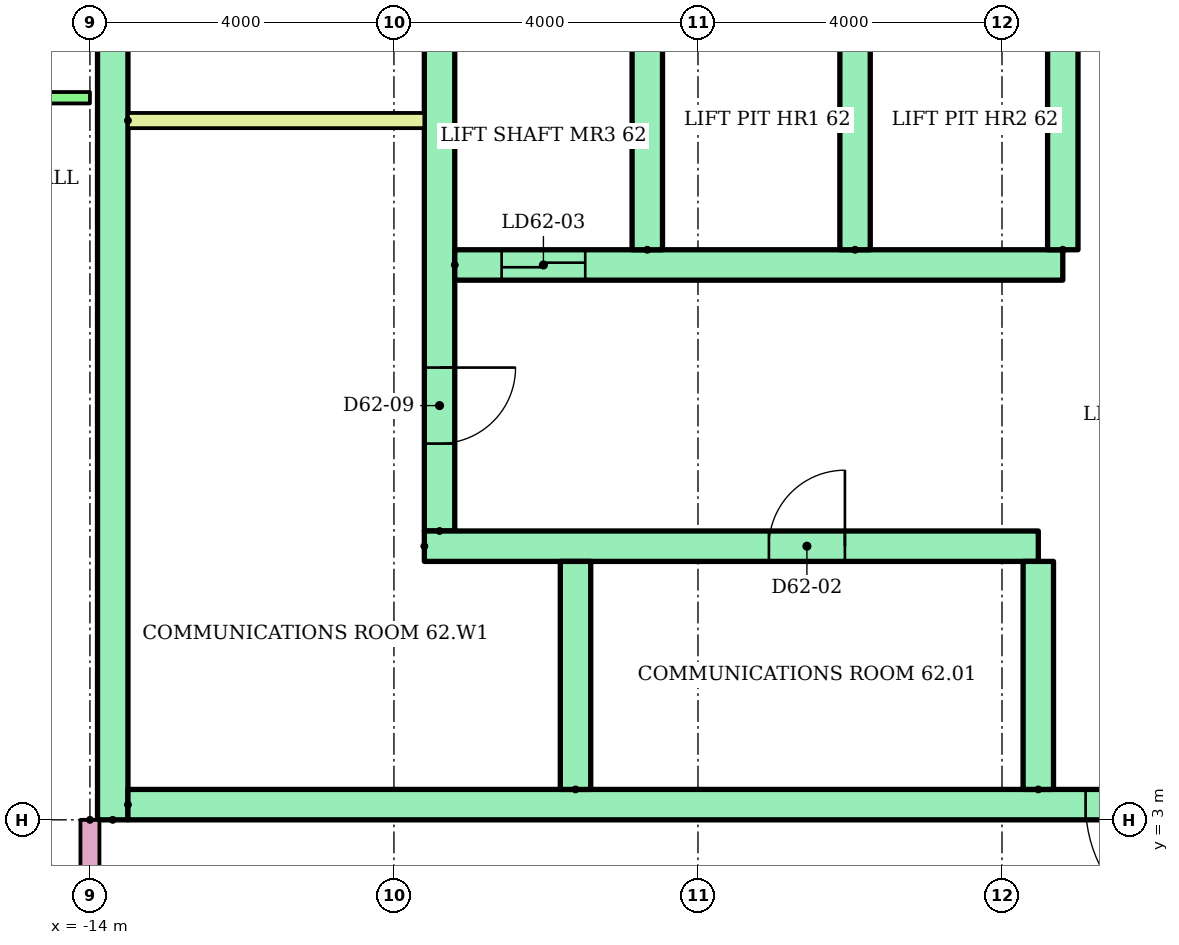
"""IFC4 building model, lengths in metres.
Left out: names, types, materials, properties, quantities, classifications, styles, units other than length and angle.
Written with IfcOpenShell. Run it as: python <this file> out.ifc"""

import sys

from ifc_helpers import new_model, si_unit, direction, frame, frame_2d, origin, place, context, subcontext, project, spatial, rectangle, extrude, element, fill, save


model = new_model("IFC4")
c1 = context("Model", 3, precision=1e-05, world=origin(), true_north=direction((0.0, 1.0)))
c2 = subcontext(c1, "Body", "Model", "MODEL_VIEW")
j1 = project(units=[si_unit("LENGTHUNIT", "METRE"), si_unit("PLANEANGLEUNIT", "RADIAN")], contexts=[c1])
p1 = place(None, origin())
s1 = spatial("IfcSite", under=j1, at=p1, CompositionType="ELEMENT")
p2 = place(p1, origin())
s2 = spatial("IfcBuilding", under=s1, at=p2, CompositionType="ELEMENT")
p3 = place(p2, frame((0.0, 0.0, 236.4)))
s3 = spatial("IfcBuildingStorey", under=s2, at=p3, CompositionType="ELEMENT", Elevation=236.4)
p4 = place(p3, frame((-13.7, 3.0, 0.0), z_axis=(0.0, 0.0, 1.0), x_axis=(0.0, 1.0, 0.0)))
e1 = element("IfcWall", 1, at=p4, inside=s3, PredefinedType="SHEAR", context=c2, shape_type="SweptSolid", body=[
    extrude(rectangle(XDim=17.0, YDim=0.4, at=frame_2d((8.5, 0.0))), origin(), (0.0, 0.0, 1.0), 2.8),
])
p5 = place(p3, frame((-9.4, 6.8, 0.0), z_axis=(0.0, 0.0, 1.0), x_axis=(0.0, 1.0, 0.0)))
e2 = element("IfcWall", 2, at=p5, inside=s3, PredefinedType="SHEAR", context=c2, shape_type="SweptSolid", body=[
    extrude(rectangle(XDim=12.7, YDim=0.4, at=frame_2d((6.35, 0.0))), origin(), (0.0, 0.0, 1.0), 2.8),
])
p6 = place(p5, frame((1.15, 0.0, 0.0)))
e3 = element("IfcOpeningElement", 3, at=p6, cuts=e2, PredefinedType="OPENING", context=c2, shape_type="SweptSolid", body=[
    extrude(rectangle(XDim=1.0, YDim=2.1, at=frame_2d((0.5, 1.05))), frame((0.0, 0.21, 0.0), z_axis=(0.0, -1.0, 0.0), x_axis=(1.0, 0.0, 0.0)), (0.0, 0.0, 1.0), 0.42),
])
p7 = place(p5, frame((7.925, 0.0, 0.0)))
e4 = element("IfcOpeningElement", 4, at=p7, cuts=e2, PredefinedType="OPENING", context=c2, shape_type="SweptSolid", body=[
    extrude(rectangle(XDim=1.0, YDim=2.1, at=frame_2d((0.5, 1.05))), frame((0.0, 0.21, 0.0), z_axis=(0.0, -1.0, 0.0), x_axis=(1.0, 0.0, 0.0)), (0.0, 0.0, 1.0), 0.42),
])
p8 = place(p3, frame((-13.5, 3.2, 0.0)))
e5 = element("IfcWall", 5, at=p8, inside=s3, PredefinedType="SHEAR", context=c2, shape_type="SweptSolid", body=[
    extrude(rectangle(XDim=27.0, YDim=0.4, at=frame_2d((13.5, 0.0))), origin(), (0.0, 0.0, 1.0), 2.8),
])
p9 = place(p8, frame((22.083, 0.0, 0.0)))
e6 = element("IfcOpeningElement", 6, at=p9, cuts=e5, PredefinedType="OPENING", context=c2, shape_type="SweptSolid", body=[
    extrude(rectangle(XDim=1.1, YDim=2.1, at=frame_2d((0.55, 1.05))), frame((0.0, 0.21, 0.0), z_axis=(0.0, -1.0, 0.0), x_axis=(1.0, 0.0, 0.0)), (0.0, 0.0, 1.0), 0.42),
])
p10 = place(p8, frame((25.128, 0.0, 0.0)))
e7 = element("IfcOpeningElement", 7, at=p10, cuts=e5, PredefinedType="OPENING", context=c2, shape_type="SweptSolid", body=[
    extrude(rectangle(XDim=1.1, YDim=2.1, at=frame_2d((0.55, 1.05))), frame((0.0, 0.21, 0.0), z_axis=(0.0, -1.0, 0.0), x_axis=(1.0, 0.0, 0.0)), (0.0, 0.0, 1.0), 0.42),
])
p11 = place(p8, frame((12.6, 0.0, 0.0)))
e8 = element("IfcOpeningElement", 8, at=p11, cuts=e5, PredefinedType="OPENING", context=c2, shape_type="SweptSolid", body=[
    extrude(rectangle(XDim=1.8, YDim=2.1, at=frame_2d((0.9, 1.05))), frame((0.0, 0.21, 0.0), z_axis=(0.0, -1.0, 0.0), x_axis=(1.0, 0.0, 0.0)), (0.0, 0.0, 1.0), 0.42),
])
p12 = place(p3, frame((-9.6, 6.6, 0.0)))
e9 = element("IfcWall", 9, at=p12, inside=s3, PredefinedType="SHEAR", context=c2, shape_type="SweptSolid", body=[
    extrude(rectangle(XDim=8.078, YDim=0.4, at=frame_2d((4.039, 0.0))), origin(), (0.0, 0.0, 1.0), 2.8),
])
p13 = place(p12, frame((4.533, 0.0, 0.0)))
e10 = element("IfcOpeningElement", 10, at=p13, cuts=e9, PredefinedType="OPENING", context=c2, shape_type="SweptSolid", body=[
    extrude(rectangle(XDim=1.0, YDim=2.1, at=frame_2d((0.5, 1.05))), frame((0.0, 0.21, 0.0), z_axis=(0.0, -1.0, 0.0), x_axis=(1.0, 0.0, 0.0)), (0.0, 0.0, 1.0), 0.42),
])
for number, where, z_axis, x_axis in (
    (11, (-7.611, 3.4, 0.0), (0.0, 0.0, 1.0), (0.0, 1.0, 0.0)),
    (12, (-1.522, 3.4, 0.0), (0.0, 0.0, 1.0), (0.0, 1.0, 0.0)),
):
    element("IfcWall", number, at=place(p3, frame(where, z_axis=z_axis, x_axis=x_axis)), inside=s3, PredefinedType="SHEAR", context=c2, shape_type="SweptSolid", body=[
        extrude(rectangle(XDim=3.0, YDim=0.4, at=frame_2d((1.5, 0.0))), origin(), (0.0, 0.0, 1.0), 2.8),
    ])
p14 = place(p3, frame((-9.2, 10.3, 0.0)))
e13 = element("IfcWall", 13, at=p14, inside=s3, PredefinedType="SHEAR", context=c2, shape_type="SweptSolid", body=[
    extrude(rectangle(XDim=8.0, YDim=0.4, at=frame_2d((4.0, 0.0))), origin(), (0.0, 0.0, 1.0), 2.8),
])
p15 = place(p14, frame((0.617, 0.0, 0.0)))
e14 = element("IfcOpeningElement", 14, at=p15, cuts=e13, PredefinedType="OPENING", context=c2, shape_type="SweptSolid", body=[
    extrude(rectangle(XDim=1.1, YDim=2.1, at=frame_2d((0.55, 1.05))), frame((0.0, 0.21, 0.0), z_axis=(0.0, -1.0, 0.0), x_axis=(1.0, 0.0, 0.0)), (0.0, 0.0, 1.0), 0.42),
])
for number, where, z_axis, x_axis in (
    (15, (-6.667, 10.5, 0.0), (0.0, 0.0, 1.0), (0.0, 1.0, 0.0)),
    (16, (-3.933, 10.5, 0.0), (0.0, 0.0, 1.0), (0.0, 1.0, 0.0)),
    (17, (-1.2, 10.5, 0.0), (0.0, 0.0, 1.0), (0.0, 1.0, 0.0)),
):
    element("IfcWall", number, at=place(p3, frame(where, z_axis=z_axis, x_axis=x_axis)), inside=s3, PredefinedType="SHEAR", context=c2, shape_type="SweptSolid", body=[
        extrude(rectangle(XDim=3.0, YDim=0.4, at=frame_2d((1.5, 0.0))), origin(), (0.0, 0.0, 1.0), 2.8),
    ])
p16 = place(p3, frame((-13.5, 12.2, 0.0)))
e18 = element("IfcWall", 18, at=p16, inside=s3, PredefinedType="PARTITIONING", context=c2, shape_type="SweptSolid", body=[
    extrude(rectangle(XDim=3.9, YDim=0.2, at=frame_2d((1.95, 0.0))), origin(), (0.0, 0.0, 1.0), 2.8),
])
p17 = place(p3, frame((-28.92, 12.5, 0.0)))
e19 = element("IfcWall", 19, at=p17, inside=s3, PredefinedType="PARTITIONING", context=c2, shape_type="SweptSolid", body=[
    extrude(rectangle(XDim=14.92, YDim=0.15, at=frame_2d((7.46, 0.0))), origin(), (0.0, 0.0, 1.0), 2.4),
])
p18 = place(p17, frame((1.97, 0.0, 0.0)))
e20 = element("IfcOpeningElement", 20, at=p18, cuts=e19, PredefinedType="OPENING", context=c2, shape_type="SweptSolid", body=[
    extrude(rectangle(XDim=1.0, YDim=2.1, at=frame_2d((0.5, 1.05))), frame((0.0, 0.085, 0.0), z_axis=(0.0, -1.0, 0.0), x_axis=(1.0, 0.0, 0.0)), (0.0, 0.0, 1.0), 0.17),
])
p19 = place(p17, frame((9.32, 0.0, 0.0)))
e21 = element("IfcOpeningElement", 21, at=p19, cuts=e19, PredefinedType="OPENING", context=c2, shape_type="SweptSolid", body=[
    extrude(rectangle(XDim=1.0, YDim=2.1, at=frame_2d((0.5, 1.05))), frame((0.0, 0.085, 0.0), z_axis=(0.0, -1.0, 0.0), x_axis=(1.0, 0.0, 0.0)), (0.0, 0.0, 1.0), 0.17),
])
p20 = place(p3, frame((-14.0, 3.0, 0.0), z_axis=(0.0, 0.0, 1.0), x_axis=(0.0, -1.0, 0.0)))
e22 = element("IfcWall", 22, at=p20, inside=s3, PredefinedType="PARTITIONING", context=c2, shape_type="SweptSolid", body=[
    extrude(rectangle(XDim=1.6, YDim=0.25, at=frame_2d((0.8, 0.0))), origin(), (0.0, 0.0, 1.0), 2.4),
])
p21 = place(p11, frame((1.8, 0.0, 0.0), z_axis=(0.0, 0.0, 1.0), x_axis=(-1.0, 0.0, 0.0)))
e23 = element("IfcDoor", 23, at=p21, inside=s3, OperationType="DOUBLE_DOOR_SINGLE_SWING", PredefinedType="DOOR", context=c2, shape_type="SweptSolid", body=[
    extrude(rectangle(XDim=1.8, YDim=2.1, at=frame_2d((0.9, 1.05))), frame((0.0, 0.025, 0.0), z_axis=(0.0, -1.0, 0.0), x_axis=(1.0, 0.0, 0.0)), (0.0, 0.0, 1.0), 0.05),
])
fill(e8, e23)
p22 = place(p13, origin())
e24 = element("IfcDoor", 24, at=p22, inside=s3, OperationType="SINGLE_SWING_RIGHT", PredefinedType="DOOR", context=c2, shape_type="SweptSolid", body=[
    extrude(rectangle(XDim=1.0, YDim=2.1, at=frame_2d((0.5, 1.05))), frame((0.0, 0.025, 0.0), z_axis=(0.0, -1.0, 0.0), x_axis=(1.0, 0.0, 0.0)), (0.0, 0.0, 1.0), 0.05),
])
fill(e10, e24)
p23 = place(p15, origin())
e25 = element("IfcDoor", 25, at=p23, inside=s3, OperationType="SLIDING_TO_LEFT", PredefinedType="DOOR", context=c2, shape_type="SweptSolid", body=[
    extrude(rectangle(XDim=1.1, YDim=2.1, at=frame_2d((0.55, 1.05))), frame((0.0, 0.025, 0.0), z_axis=(0.0, -1.0, 0.0), x_axis=(1.0, 0.0, 0.0)), (0.0, 0.0, 1.0), 0.05),
])
fill(e14, e25)
p24 = place(p6, frame((1.0, 0.0, 0.0), z_axis=(0.0, 0.0, 1.0), x_axis=(-1.0, 0.0, 0.0)))
e26 = element("IfcDoor", 26, at=p24, inside=s3, OperationType="SINGLE_SWING_RIGHT", PredefinedType="DOOR", context=c2, shape_type="SweptSolid", body=[
    extrude(rectangle(XDim=1.0, YDim=2.1, at=frame_2d((0.5, 1.05))), frame((0.0, 0.025, 0.0), z_axis=(0.0, -1.0, 0.0), x_axis=(1.0, 0.0, 0.0)), (0.0, 0.0, 1.0), 0.05),
])
fill(e3, e26)
save(model, sys.argv[1])
